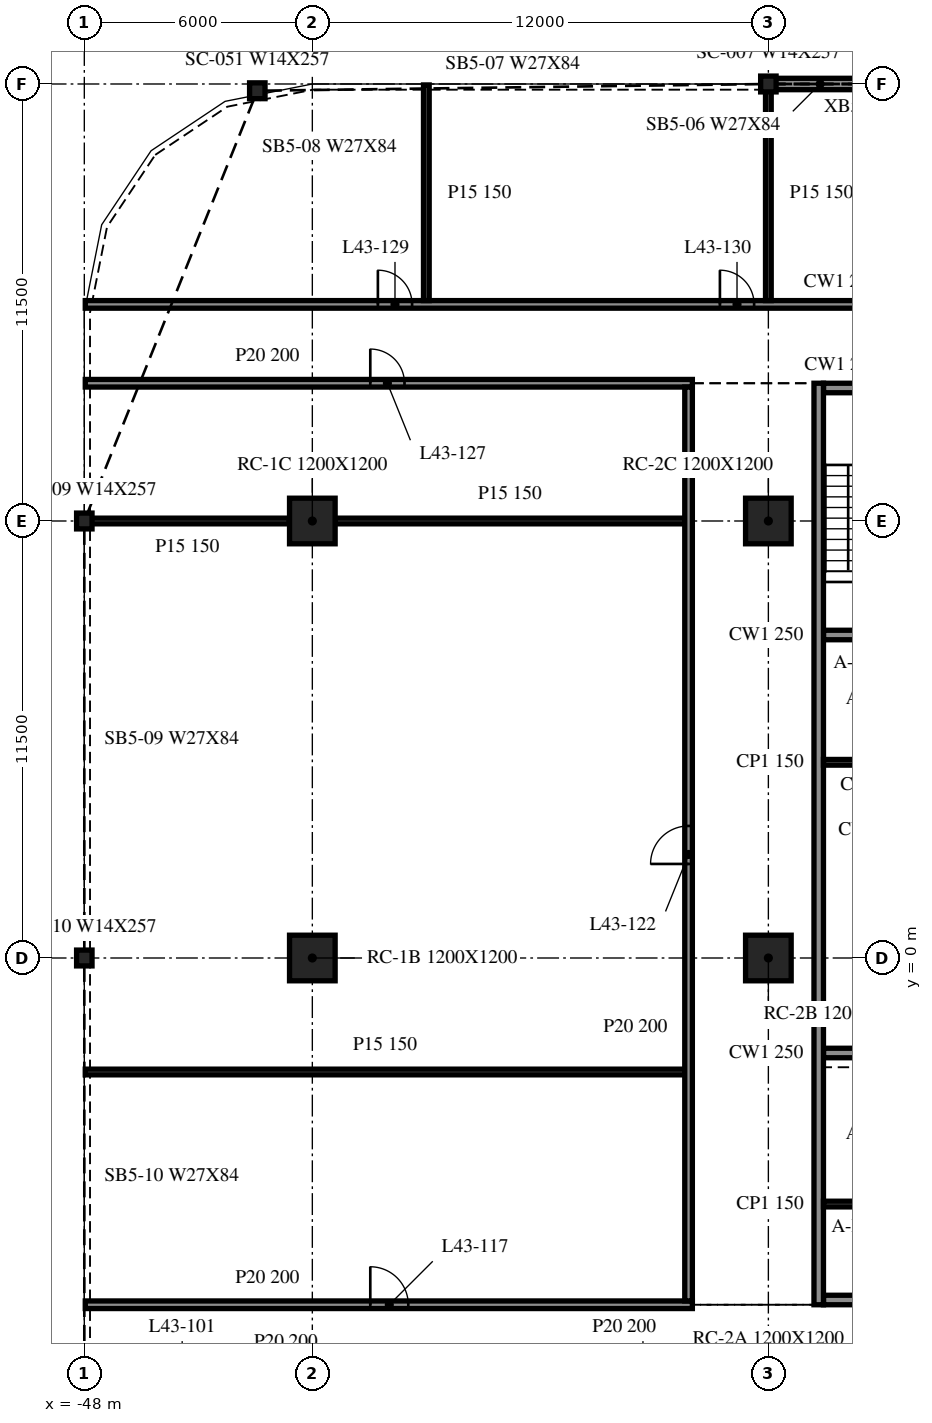
"""IFC4 building model, lengths in metres.
Left out: names, types, materials, properties, quantities, classifications, styles, units other than length and angle.
Written with IfcOpenShell. Run it as: python <this file> out.ifc"""

import sys

from ifc_helpers import new_model, si_unit, direction, frame, frame_2d, origin, origin_2d, place, context, subcontext, project, spatial, rectangle, i_section, extrude, element, fill, save


model = new_model("IFC4")
c1 = context("Model", 3, precision=1e-05, world=origin(), true_north=direction((0.0, 1.0)))
c2 = subcontext(c1, "Body", "Model", "MODEL_VIEW")
j1 = project(units=[si_unit("LENGTHUNIT", "METRE"), si_unit("PLANEANGLEUNIT", "RADIAN")], contexts=[c1])
p1 = place(None, origin())
s1 = spatial("IfcSite", under=j1, at=p1, CompositionType="ELEMENT")
p2 = place(p1, origin())
s2 = spatial("IfcBuilding", under=s1, at=p2, CompositionType="ELEMENT")
p3 = place(p2, frame((0.0, 0.0, 182.0)))
s3 = spatial("IfcBuildingStorey", under=s2, at=p3, CompositionType="ELEMENT", Elevation=182.0)
for number, where, z_axis, x_axis in (
    (1, (-42.0, 0.0, -0.34), (0.0, 0.0, 1.0), (1.0, 0.0, 0.0)),
    (2, (-42.0, 11.5, -0.34), (0.0, 0.0, 1.0), (1.0, 0.0, 0.0)),
    (3, (-30.0, 0.0, -0.34), (0.0, 0.0, 1.0), (1.0, 0.0, 0.0)),
    (4, (-30.0, 11.5, -0.34), (0.0, 0.0, 1.0), (1.0, 0.0, 0.0)),
):
    element("IfcColumn", number, at=place(p3, frame(where, z_axis=z_axis, x_axis=x_axis)), inside=s3, PredefinedType="COLUMN", context=c2, shape_type="SweptSolid", body=[
        extrude(rectangle(XDim=1.2, YDim=1.2, at=origin_2d()), origin(), (0.0, 0.0, 1.0), 3.8),
    ])
for number, where, z_axis, x_axis in (
    (5, (-30.0, 23.0, -0.34), (0.0, 0.0, 1.0), (1.0, 0.0, 0.0)),
    (6, (-43.448, 22.822, -0.34), (0.0, 0.0, 1.0), (1.0, 0.0, 0.0)),
    (7, (-48.0, 11.5, -0.34), (0.0, 0.0, 1.0), (1.0, 0.0, 0.0)),
    (8, (-48.0, 0.0, -0.34), (0.0, 0.0, 1.0), (1.0, 0.0, 0.0)),
):
    element("IfcColumn", number, at=place(p3, frame(where, z_axis=z_axis, x_axis=x_axis)), inside=s3, PredefinedType="COLUMN", context=c2, shape_type="SweptSolid", body=[
        extrude(i_section(OverallWidth=0.406, OverallDepth=0.417, WebThickness=0.03, FlangeThickness=0.048, at=origin_2d()), origin(), (0.0, 0.0, 1.0), 3.8),
    ])
p4 = place(p3, frame((-18.015, 23.0, 0.0), z_axis=(0.0, 0.0, 1.0), x_axis=(-1.0, 0.0, 0.0)))
e9 = element("IfcWall", 9, at=p4, inside=s3, PredefinedType="NOTDEFINED", context=c2, shape_type="SweptSolid", body=[
    extrude(rectangle(XDim=11.97, YDim=0.3, at=frame_2d((5.985, 0.0))), origin(), (0.0, 0.0, 1.0), 2.782),
])
p5 = place(p3, frame((-28.675, 15.125, 0.0), z_axis=(0.0, 0.0, 1.0), x_axis=(0.0, -1.0, 0.0)))
e10 = element("IfcWall", 10, at=p5, inside=s3, PredefinedType="SOLIDWALL", context=c2, shape_type="SweptSolid", body=[
    extrude(rectangle(XDim=24.25, YDim=0.25, at=frame_2d((12.125, 0.0))), origin(), (0.0, 0.0, 1.0), 3.46),
])
p6 = place(p3, frame((-19.45, -9.0, 0.0), z_axis=(0.0, 0.0, 1.0), x_axis=(-1.0, 0.0, 0.0)))
e11 = element("IfcWall", 11, at=p6, inside=s3, PredefinedType="SOLIDWALL", context=c2, shape_type="SweptSolid", body=[
    extrude(rectangle(XDim=9.1, YDim=0.25, at=frame_2d((4.55, 0.0))), origin(), (0.0, 0.0, 1.0), 3.46),
])
p7 = place(p6, frame((3.65, 0.0, 0.0)))
e12 = element("IfcOpeningElement", 12, at=p7, cuts=e11, PredefinedType="OPENING", context=c2, shape_type="SweptSolid", body=[
    extrude(rectangle(XDim=1.8, YDim=2.1, at=frame_2d((0.9, 1.05))), frame((0.0, 0.135, 0.0), z_axis=(0.0, -1.0, 0.0), x_axis=(1.0, 0.0, 0.0)), (0.0, 0.0, 1.0), 0.27),
])
p8 = place(p3, frame((-28.55, 15.0, 0.0), z_axis=(0.0, 0.0, 1.0), x_axis=(1.0, 0.0, 0.0)))
e13 = element("IfcWall", 13, at=p8, inside=s3, PredefinedType="SOLIDWALL", context=c2, shape_type="SweptSolid", body=[
    extrude(rectangle(XDim=9.1, YDim=0.25, at=frame_2d((4.55, 0.0))), origin(), (0.0, 0.0, 1.0), 3.46),
])
p9 = place(p8, frame((3.65, 0.0, 0.0)))
e14 = element("IfcOpeningElement", 14, at=p9, cuts=e13, PredefinedType="OPENING", context=c2, shape_type="SweptSolid", body=[
    extrude(rectangle(XDim=1.8, YDim=2.1, at=frame_2d((0.9, 1.05))), frame((0.0, 0.135, 0.0), z_axis=(0.0, -1.0, 0.0), x_axis=(1.0, 0.0, 0.0)), (0.0, 0.0, 1.0), 0.27),
])
for number, where, z_axis, x_axis in (
    (15, (-28.55, -2.5, 0.0), (0.0, 0.0, 1.0), (1.0, 0.0, 0.0)),
    (16, (-28.55, 8.5, 0.0), (0.0, 0.0, 1.0), (1.0, 0.0, 0.0)),
):
    element("IfcWall", number, at=place(p3, frame(where, z_axis=z_axis, x_axis=x_axis)), inside=s3, PredefinedType="SOLIDWALL", context=c2, shape_type="SweptSolid", body=[
        extrude(rectangle(XDim=2.85, YDim=0.25, at=frame_2d((1.425, 0.0))), origin(), (0.0, 0.0, 1.0), 3.46),
    ])
for number, where, z_axis, x_axis in (
    (17, (-28.55, 5.15, 0.0), (0.0, 0.0, 1.0), (1.0, 0.0, 0.0)),
    (18, (-28.55, -6.475, 0.0), (0.0, 0.0, 1.0), (1.0, 0.0, 0.0)),
):
    element("IfcWall", number, at=place(p3, frame(where, z_axis=z_axis, x_axis=x_axis)), inside=s3, PredefinedType="PARTITIONING", context=c2, shape_type="SweptSolid", body=[
        extrude(rectangle(XDim=2.85, YDim=0.15, at=frame_2d((1.425, 0.0))), origin(), (0.0, 0.0, 1.0), 3.46),
    ])
p10 = place(p3, frame((-47.975, -9.125, 0.0), z_axis=(0.0, 0.0, 1.0), x_axis=(1.0, 0.0, 0.0)))
e19 = element("IfcWall", 19, at=p10, inside=s3, PredefinedType="PARTITIONING", context=c2, shape_type="SweptSolid", body=[
    extrude(rectangle(XDim=15.975, YDim=0.2, at=frame_2d((7.988, 0.0))), origin(), (0.0, 0.0, 1.0), 3.46),
])
p11 = place(p10, frame((7.5, 0.0, 0.0)))
e20 = element("IfcOpeningElement", 20, at=p11, cuts=e19, PredefinedType="OPENING", context=c2, shape_type="SweptSolid", body=[
    extrude(rectangle(XDim=1.0, YDim=2.1, at=frame_2d((0.5, 1.05))), frame((0.0, 0.11, 0.0), z_axis=(0.0, -1.0, 0.0), x_axis=(1.0, 0.0, 0.0)), (0.0, 0.0, 1.0), 0.22),
])
p12 = place(p3, frame((-47.975, -3.0, 0.0), z_axis=(0.0, 0.0, 1.0), x_axis=(1.0, 0.0, 0.0)))
e21 = element("IfcWall", 21, at=p12, inside=s3, PredefinedType="PARTITIONING", context=c2, shape_type="SweptSolid", body=[
    extrude(rectangle(XDim=15.775, YDim=0.15, at=frame_2d((7.888, 0.0))), origin(), (0.0, 0.0, 1.0), 3.46),
])
p13 = place(p3, frame((-47.975, 11.5, 0.0), z_axis=(0.0, 0.0, 1.0), x_axis=(1.0, 0.0, 0.0)))
e22 = element("IfcWall", 22, at=p13, inside=s3, PredefinedType="PARTITIONING", context=c2, shape_type="SweptSolid", body=[
    extrude(rectangle(XDim=5.375, YDim=0.15, at=frame_2d((2.688, 0.0))), origin(), (0.0, 0.0, 1.0), 3.46),
])
p14 = place(p3, frame((-41.4, 11.5, 0.0), z_axis=(0.0, 0.0, 1.0), x_axis=(1.0, 0.0, 0.0)))
e23 = element("IfcWall", 23, at=p14, inside=s3, PredefinedType="PARTITIONING", context=c2, shape_type="SweptSolid", body=[
    extrude(rectangle(XDim=9.2, YDim=0.15, at=frame_2d((4.6, 0.0))), origin(), (0.0, 0.0, 1.0), 3.46),
])
p15 = place(p3, frame((-47.975, 15.125, 0.0), z_axis=(0.0, 0.0, 1.0), x_axis=(1.0, 0.0, 0.0)))
e24 = element("IfcWall", 24, at=p15, inside=s3, PredefinedType="PARTITIONING", context=c2, shape_type="SweptSolid", body=[
    extrude(rectangle(XDim=15.975, YDim=0.2, at=frame_2d((7.988, 0.0))), origin(), (0.0, 0.0, 1.0), 3.46),
])
p16 = place(p15, frame((7.5, 0.0, 0.0)))
e25 = element("IfcOpeningElement", 25, at=p16, cuts=e24, PredefinedType="OPENING", context=c2, shape_type="SweptSolid", body=[
    extrude(rectangle(XDim=0.9, YDim=2.1, at=frame_2d((0.45, 1.05))), frame((0.0, 0.11, 0.0), z_axis=(0.0, -1.0, 0.0), x_axis=(1.0, 0.0, 0.0)), (0.0, 0.0, 1.0), 0.22),
])
p17 = place(p3, frame((-47.975, 17.2, 0.0), z_axis=(0.0, 0.0, 1.0), x_axis=(1.0, 0.0, 0.0)))
e26 = element("IfcWall", 26, at=p17, inside=s3, PredefinedType="PARTITIONING", context=c2, shape_type="SweptSolid", body=[
    extrude(rectangle(XDim=95.95, YDim=0.2, at=frame_2d((47.975, 0.0))), origin(), (0.0, 0.0, 1.0), 3.46),
])
p18 = place(p17, frame((7.7, 0.0, 0.0)))
e27 = element("IfcOpeningElement", 27, at=p18, cuts=e26, PredefinedType="OPENING", context=c2, shape_type="SweptSolid", body=[
    extrude(rectangle(XDim=0.9, YDim=2.1, at=frame_2d((0.45, 1.05))), frame((0.0, 0.11, 0.0), z_axis=(0.0, -1.0, 0.0), x_axis=(1.0, 0.0, 0.0)), (0.0, 0.0, 1.0), 0.22),
])
p19 = place(p17, frame((16.7, 0.0, 0.0)))
e28 = element("IfcOpeningElement", 28, at=p19, cuts=e26, PredefinedType="OPENING", context=c2, shape_type="SweptSolid", body=[
    extrude(rectangle(XDim=0.9, YDim=2.1, at=frame_2d((0.45, 1.05))), frame((0.0, 0.11, 0.0), z_axis=(0.0, -1.0, 0.0), x_axis=(1.0, 0.0, 0.0)), (0.0, 0.0, 1.0), 0.22),
])
p20 = place(p17, frame((22.7, 0.0, 0.0)))
e29 = element("IfcOpeningElement", 29, at=p20, cuts=e26, PredefinedType="OPENING", context=c2, shape_type="SweptSolid", body=[
    extrude(rectangle(XDim=0.9, YDim=2.1, at=frame_2d((0.45, 1.05))), frame((0.0, 0.11, 0.0), z_axis=(0.0, -1.0, 0.0), x_axis=(1.0, 0.0, 0.0)), (0.0, 0.0, 1.0), 0.22),
])
p21 = place(p17, frame((26.1, 0.0, 0.0)))
e30 = element("IfcOpeningElement", 30, at=p21, cuts=e26, PredefinedType="OPENING", context=c2, shape_type="SweptSolid", body=[
    extrude(rectangle(XDim=0.9, YDim=2.1, at=frame_2d((0.45, 1.05))), frame((0.0, 0.11, 0.0), z_axis=(0.0, -1.0, 0.0), x_axis=(1.0, 0.0, 0.0)), (0.0, 0.0, 1.0), 0.22),
])
p22 = place(p17, frame((28.7, 0.0, 0.0)))
e31 = element("IfcOpeningElement", 31, at=p22, cuts=e26, PredefinedType="OPENING", context=c2, shape_type="SweptSolid", body=[
    extrude(rectangle(XDim=0.9, YDim=2.1, at=frame_2d((0.45, 1.05))), frame((0.0, 0.11, 0.0), z_axis=(0.0, -1.0, 0.0), x_axis=(1.0, 0.0, 0.0)), (0.0, 0.0, 1.0), 0.22),
])
p23 = place(p17, frame((37.7, 0.0, 0.0)))
e32 = element("IfcOpeningElement", 32, at=p23, cuts=e26, PredefinedType="OPENING", context=c2, shape_type="SweptSolid", body=[
    extrude(rectangle(XDim=0.9, YDim=2.1, at=frame_2d((0.45, 1.05))), frame((0.0, 0.11, 0.0), z_axis=(0.0, -1.0, 0.0), x_axis=(1.0, 0.0, 0.0)), (0.0, 0.0, 1.0), 0.22),
])
p24 = place(p17, frame((46.7, 0.0, 0.0)))
e33 = element("IfcOpeningElement", 33, at=p24, cuts=e26, PredefinedType="OPENING", context=c2, shape_type="SweptSolid", body=[
    extrude(rectangle(XDim=0.9, YDim=2.1, at=frame_2d((0.45, 1.05))), frame((0.0, 0.11, 0.0), z_axis=(0.0, -1.0, 0.0), x_axis=(1.0, 0.0, 0.0)), (0.0, 0.0, 1.0), 0.22),
])
p25 = place(p17, frame((48.1, 0.0, 0.0)))
e34 = element("IfcOpeningElement", 34, at=p25, cuts=e26, PredefinedType="OPENING", context=c2, shape_type="SweptSolid", body=[
    extrude(rectangle(XDim=0.9, YDim=2.1, at=frame_2d((0.45, 1.05))), frame((0.0, 0.11, 0.0), z_axis=(0.0, -1.0, 0.0), x_axis=(1.0, 0.0, 0.0)), (0.0, 0.0, 1.0), 0.22),
])
p26 = place(p17, frame((54.1, 0.0, 0.0)))
e35 = element("IfcOpeningElement", 35, at=p26, cuts=e26, PredefinedType="OPENING", context=c2, shape_type="SweptSolid", body=[
    extrude(rectangle(XDim=0.9, YDim=2.1, at=frame_2d((0.45, 1.05))), frame((0.0, 0.11, 0.0), z_axis=(0.0, -1.0, 0.0), x_axis=(1.0, 0.0, 0.0)), (0.0, 0.0, 1.0), 0.22),
])
p27 = place(p17, frame((57.5, 0.0, 0.0)))
e36 = element("IfcOpeningElement", 36, at=p27, cuts=e26, PredefinedType="OPENING", context=c2, shape_type="SweptSolid", body=[
    extrude(rectangle(XDim=0.9, YDim=2.1, at=frame_2d((0.45, 1.05))), frame((0.0, 0.11, 0.0), z_axis=(0.0, -1.0, 0.0), x_axis=(1.0, 0.0, 0.0)), (0.0, 0.0, 1.0), 0.22),
])
p28 = place(p17, frame((60.1, 0.0, 0.0)))
e37 = element("IfcOpeningElement", 37, at=p28, cuts=e26, PredefinedType="OPENING", context=c2, shape_type="SweptSolid", body=[
    extrude(rectangle(XDim=0.9, YDim=2.1, at=frame_2d((0.45, 1.05))), frame((0.0, 0.11, 0.0), z_axis=(0.0, -1.0, 0.0), x_axis=(1.0, 0.0, 0.0)), (0.0, 0.0, 1.0), 0.22),
])
p29 = place(p17, frame((69.1, 0.0, 0.0)))
e38 = element("IfcOpeningElement", 38, at=p29, cuts=e26, PredefinedType="OPENING", context=c2, shape_type="SweptSolid", body=[
    extrude(rectangle(XDim=0.9, YDim=2.1, at=frame_2d((0.45, 1.05))), frame((0.0, 0.11, 0.0), z_axis=(0.0, -1.0, 0.0), x_axis=(1.0, 0.0, 0.0)), (0.0, 0.0, 1.0), 0.22),
])
p30 = place(p17, frame((78.1, 0.0, 0.0)))
e39 = element("IfcOpeningElement", 39, at=p30, cuts=e26, PredefinedType="OPENING", context=c2, shape_type="SweptSolid", body=[
    extrude(rectangle(XDim=0.9, YDim=2.1, at=frame_2d((0.45, 1.05))), frame((0.0, 0.11, 0.0), z_axis=(0.0, -1.0, 0.0), x_axis=(1.0, 0.0, 0.0)), (0.0, 0.0, 1.0), 0.22),
])
p31 = place(p17, frame((84.1, 0.0, 0.0)))
e40 = element("IfcOpeningElement", 40, at=p31, cuts=e26, PredefinedType="OPENING", context=c2, shape_type="SweptSolid", body=[
    extrude(rectangle(XDim=0.9, YDim=2.1, at=frame_2d((0.45, 1.05))), frame((0.0, 0.11, 0.0), z_axis=(0.0, -1.0, 0.0), x_axis=(1.0, 0.0, 0.0)), (0.0, 0.0, 1.0), 0.22),
])
p32 = place(p17, frame((87.5, 0.0, 0.0)))
e41 = element("IfcOpeningElement", 41, at=p32, cuts=e26, PredefinedType="OPENING", context=c2, shape_type="SweptSolid", body=[
    extrude(rectangle(XDim=0.9, YDim=2.1, at=frame_2d((0.45, 1.05))), frame((0.0, 0.11, 0.0), z_axis=(0.0, -1.0, 0.0), x_axis=(1.0, 0.0, 0.0)), (0.0, 0.0, 1.0), 0.22),
])
p33 = place(p17, frame((90.1, 0.0, 0.0)))
e42 = element("IfcOpeningElement", 42, at=p33, cuts=e26, PredefinedType="OPENING", context=c2, shape_type="SweptSolid", body=[
    extrude(rectangle(XDim=0.9, YDim=2.1, at=frame_2d((0.45, 1.05))), frame((0.0, 0.11, 0.0), z_axis=(0.0, -1.0, 0.0), x_axis=(1.0, 0.0, 0.0)), (0.0, 0.0, 1.0), 0.22),
])
p34 = place(p3, frame((-39.0, 17.3, 0.0), z_axis=(0.0, 0.0, 1.0), x_axis=(0.0, 1.0, 0.0)))
e43 = element("IfcWall", 43, at=p34, inside=s3, PredefinedType="PARTITIONING", context=c2, shape_type="SweptSolid", body=[
    extrude(rectangle(XDim=5.675, YDim=0.15, at=frame_2d((2.837, 0.0))), origin(), (0.0, 0.0, 1.0), 3.46),
])
p35 = place(p3, frame((-32.1, -9.025, 0.0), z_axis=(0.0, 0.0, 1.0), x_axis=(0.0, 1.0, 0.0)))
e44 = element("IfcWall", 44, at=p35, inside=s3, PredefinedType="PARTITIONING", context=c2, shape_type="SweptSolid", body=[
    extrude(rectangle(XDim=24.05, YDim=0.2, at=frame_2d((12.025, 0.0))), origin(), (0.0, 0.0, 1.0), 3.46),
])
p36 = place(p35, frame((11.5, 0.0, 0.0)))
e45 = element("IfcOpeningElement", 45, at=p36, cuts=e44, PredefinedType="OPENING", context=c2, shape_type="SweptSolid", body=[
    extrude(rectangle(XDim=1.0, YDim=2.1, at=frame_2d((0.5, 1.05))), frame((0.0, 0.11, 0.0), z_axis=(0.0, -1.0, 0.0), x_axis=(1.0, 0.0, 0.0)), (0.0, 0.0, 1.0), 0.22),
])
p37 = place(p3, frame((-30.0, 17.3, 0.0), z_axis=(0.0, 0.0, 1.0), x_axis=(0.0, 1.0, 0.0)))
e46 = element("IfcWall", 46, at=p37, inside=s3, PredefinedType="PARTITIONING", context=c2, shape_type="SweptSolid", body=[
    extrude(rectangle(XDim=5.675, YDim=0.15, at=frame_2d((2.837, 0.0))), origin(), (0.0, 0.0, 1.0), 3.46),
])
p38 = place(p11, origin())
e47 = element("IfcDoor", 47, at=p38, inside=s3, OperationType="SINGLE_SWING_RIGHT", PredefinedType="DOOR", context=c2, shape_type="SweptSolid", body=[
    extrude(rectangle(XDim=1.0, YDim=2.1, at=frame_2d((0.5, 1.05))), frame((0.0, 0.025, 0.0), z_axis=(0.0, -1.0, 0.0), x_axis=(1.0, 0.0, 0.0)), (0.0, 0.0, 1.0), 0.05),
])
fill(e20, e47)
p39 = place(p36, origin())
e48 = element("IfcDoor", 48, at=p39, inside=s3, OperationType="SINGLE_SWING_LEFT", PredefinedType="DOOR", context=c2, shape_type="SweptSolid", body=[
    extrude(rectangle(XDim=1.0, YDim=2.1, at=frame_2d((0.5, 1.05))), frame((0.0, 0.025, 0.0), z_axis=(0.0, -1.0, 0.0), x_axis=(1.0, 0.0, 0.0)), (0.0, 0.0, 1.0), 0.05),
])
fill(e45, e48)
p40 = place(p16, origin())
e49 = element("IfcDoor", 49, at=p40, inside=s3, OperationType="SINGLE_SWING_LEFT", PredefinedType="DOOR", context=c2, shape_type="SweptSolid", body=[
    extrude(rectangle(XDim=0.9, YDim=2.1, at=frame_2d((0.45, 1.05))), frame((0.0, 0.025, 0.0), z_axis=(0.0, -1.0, 0.0), x_axis=(1.0, 0.0, 0.0)), (0.0, 0.0, 1.0), 0.05),
])
fill(e25, e49)
p41 = place(p18, origin())
e50 = element("IfcDoor", 50, at=p41, inside=s3, OperationType="SINGLE_SWING_LEFT", PredefinedType="DOOR", context=c2, shape_type="SweptSolid", body=[
    extrude(rectangle(XDim=0.9, YDim=2.1, at=frame_2d((0.45, 1.05))), frame((0.0, 0.025, 0.0), z_axis=(0.0, -1.0, 0.0), x_axis=(1.0, 0.0, 0.0)), (0.0, 0.0, 1.0), 0.05),
])
fill(e27, e50)
p42 = place(p19, origin())
e51 = element("IfcDoor", 51, at=p42, inside=s3, OperationType="SINGLE_SWING_LEFT", PredefinedType="DOOR", context=c2, shape_type="SweptSolid", body=[
    extrude(rectangle(XDim=0.9, YDim=2.1, at=frame_2d((0.45, 1.05))), frame((0.0, 0.025, 0.0), z_axis=(0.0, -1.0, 0.0), x_axis=(1.0, 0.0, 0.0)), (0.0, 0.0, 1.0), 0.05),
])
fill(e28, e51)
save(model, sys.argv[1])
